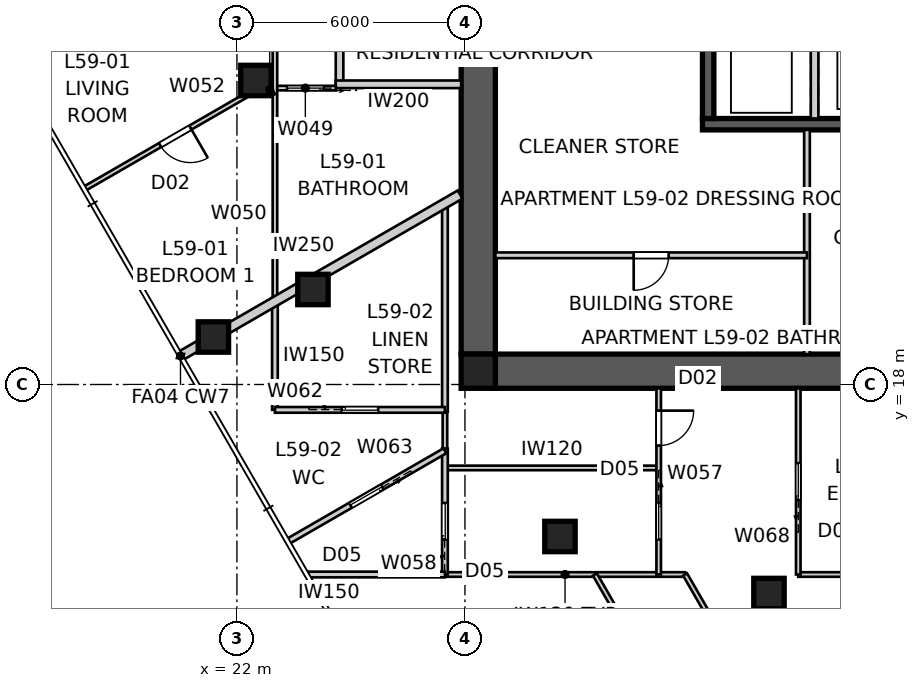
"""IFC4 building model, lengths in metres.
Left out: names, types, materials, properties, quantities, classifications, styles, units other than length and angle.
Written with IfcOpenShell. Run it as: python <this file> out.ifc"""

import sys

from ifc_helpers import new_model, si_unit, direction, frame, frame_2d, origin, origin_2d, place, context, subcontext, project, spatial, polyline, rectangle, outline, extrude, element, fill, save


model = new_model("IFC4")
c1 = context("Model", 3, precision=1e-05, world=origin(), true_north=direction((0.0, 1.0)))
c2 = subcontext(c1, "Body", "Model", "MODEL_VIEW")
j1 = project(units=[si_unit("LENGTHUNIT", "METRE"), si_unit("PLANEANGLEUNIT", "RADIAN")], contexts=[c1])
p1 = place(None, origin())
s1 = spatial("IfcSite", under=j1, at=p1, CompositionType="ELEMENT")
p2 = place(p1, origin())
s2 = spatial("IfcBuilding", under=s1, at=p2, CompositionType="ELEMENT")
p3 = place(p2, frame((0.0, 0.0, 215.0)))
s3 = spatial("IfcBuildingStorey", under=s2, at=p3, CompositionType="ELEMENT", Elevation=215.0)
p4 = place(p3, frame((51.2, 18.35, 0.0), z_axis=(0.0, 0.0, 1.0), x_axis=(-1.0, 0.0, 0.0)))
e1 = element("IfcWall", 1, at=p4, inside=s3, PredefinedType="SHEAR", context=c2, shape_type="SweptSolid", body=[
    extrude(outline(polyline([(0.0, -0.45), (22.4, -0.45), (22.4, -0.025), (22.85, -0.025), (22.85, 0.025), (22.4, 0.025), (22.4, 0.45), (0.0, 0.45), (0.0, 0.025), (-0.45, 0.025), (-0.45, -0.025), (0.0, -0.025), (0.0, -0.45)])), origin(), (0.0, 0.0, 1.0), 3.4),
])
p5 = place(p3, frame((28.35, 41.2, 0.0), z_axis=(0.0, 0.0, 1.0), x_axis=(0.0, -1.0, 0.0)))
e2 = element("IfcWall", 2, at=p5, inside=s3, PredefinedType="SHEAR", context=c2, shape_type="SweptSolid", body=[
    extrude(outline(polyline([(0.0, -0.45), (22.4, -0.45), (22.4, -0.025), (22.85, -0.025), (22.85, 0.025), (22.4, 0.025), (22.4, 0.45), (0.0, 0.45), (0.0, 0.025), (-0.45, 0.025), (-0.45, -0.025), (0.0, -0.025), (0.0, -0.45)])), origin(), (0.0, 0.0, 1.0), 3.4),
])
p6 = place(p5, frame((11.14, 0.0, 0.0)))
e3 = element("IfcOpeningElement", 3, at=p6, cuts=e2, PredefinedType="OPENING", context=c2, shape_type="SweptSolid", body=[
    extrude(rectangle(XDim=1.02, YDim=2.4, at=frame_2d((0.51, 1.2))), frame((0.0, 0.46, 0.0), z_axis=(0.0, -1.0, 0.0), x_axis=(1.0, 0.0, 0.0)), (0.0, 0.0, 1.0), 0.92),
])
p7 = place(p3, frame((45.75, 24.85, 0.0), z_axis=(0.0, 0.0, 1.0), x_axis=(-1.0, 0.0, 0.0)))
e4 = element("IfcWall", 4, at=p7, inside=s3, PredefinedType="SHEAR", context=c2, shape_type="SweptSolid", body=[
    extrude(rectangle(XDim=11.5, YDim=0.3, at=frame_2d((5.75, 0.0))), origin(), (0.0, 0.0, 1.0), 3.4),
])
p8 = place(p3, frame((37.2, 27.8, 0.0), z_axis=(0.0, 0.0, 1.0), x_axis=(0.0, -1.0, 0.0)))
e5 = element("IfcWall", 5, at=p8, inside=s3, PredefinedType="SOLIDWALL", context=c2, shape_type="SweptSolid", body=[
    extrude(rectangle(XDim=2.8, YDim=0.2, at=frame_2d((1.4, 0.0))), origin(), (0.0, 0.0, 1.0), 3.4),
])
p9 = place(p3, frame((34.4, 27.8, 0.0), z_axis=(0.0, 0.0, 1.0), x_axis=(0.0, -1.0, 0.0)))
e6 = element("IfcWall", 6, at=p9, inside=s3, PredefinedType="SHEAR", context=c2, shape_type="SweptSolid", body=[
    extrude(rectangle(XDim=2.8, YDim=0.3, at=frame_2d((1.4, 0.0))), origin(), (0.0, 0.0, 1.0), 3.4),
])
p10 = place(p3, frame((28.35, 18.35, 0.0), z_axis=(0.0, 0.0, 1.0), x_axis=(1.0, 0.0, 0.0)))
e7 = element("IfcColumn", 7, at=p10, inside=s3, PredefinedType="COLUMN", context=c2, shape_type="SweptSolid", body=[
    extrude(rectangle(XDim=0.9, YDim=0.9, at=origin_2d()), origin(), (0.0, 0.0, 1.0), 3.4),
])
for number, where, z_axis, x_axis in (
    (8, (21.38, 19.25, 0.0), (0.0, 0.0, 1.0), (1.0, 0.0, 0.0)),
    (9, (22.5, 26.0, 0.0), (0.0, 0.0, 1.0), (1.0, 0.0, 0.0)),
    (10, (24.0, 20.5, 0.0), (0.0, 0.0, 1.0), (1.0, 0.0, 0.0)),
    (11, (30.5, 14.0, 0.0), (0.0, 0.0, 1.0), (1.0, 0.0, 0.0)),
    (12, (36.0, 12.5, 0.0), (0.0, 0.0, 1.0), (1.0, 0.0, 0.0)),
):
    element("IfcColumn", number, at=place(p3, frame(where, z_axis=z_axis, x_axis=x_axis)), inside=s3, PredefinedType="COLUMN", context=c2, shape_type="SweptSolid", body=[
        extrude(rectangle(XDim=0.8, YDim=0.8, at=origin_2d()), origin(), (0.0, 0.0, 1.0), 3.4),
    ])
p11 = place(p3, frame((24.7, 25.9, 0.0), z_axis=(0.0, 0.0, 1.0), x_axis=(0.0, 1.0, 0.0)))
e13 = element("IfcWall", 13, at=p11, inside=s3, PredefinedType="PARTITIONING", context=c2, shape_type="SweptSolid", body=[
    extrude(rectangle(XDim=8.2, YDim=0.2, at=frame_2d((4.1, 0.0))), origin(), (0.0, 0.0, 1.0), 3.25),
])
p12 = place(p11, frame((2.687, 0.0, 0.0)))
e14 = element("IfcOpeningElement", 14, at=p12, cuts=e13, PredefinedType="OPENING", context=c2, shape_type="SweptSolid", body=[
    extrude(rectangle(XDim=1.02, YDim=2.34, at=frame_2d((0.51, 1.17))), frame((0.0, 0.11, 0.0), z_axis=(0.0, -1.0, 0.0), x_axis=(1.0, 0.0, 0.0)), (0.0, 0.0, 1.0), 0.22),
])
p13 = place(p3, frame((27.9, 25.9, 0.0), z_axis=(0.0, 0.0, 1.0), x_axis=(-1.0, 0.0, 0.0)))
e15 = element("IfcWall", 15, at=p13, inside=s3, PredefinedType="PARTITIONING", context=c2, shape_type="SweptSolid", body=[
    extrude(rectangle(XDim=3.3, YDim=0.2, at=frame_2d((1.65, 0.0))), origin(), (0.0, 0.0, 1.0), 3.25),
])
p14 = place(p3, frame((20.514, 18.75, 0.0), z_axis=(0.0, 0.0, 1.0), x_axis=(0.866020489494, 0.500008511703, 0.0)))
e16 = element("IfcWall", 16, at=p14, inside=s3, PredefinedType="PARTITIONING", context=c2, shape_type="SweptSolid", body=[
    extrude(rectangle(XDim=8.496, YDim=0.25, at=frame_2d((4.248, 0.0))), origin(), (0.0, 0.0, 1.0), 3.25),
])
p15 = place(p3, frame((15.889, 26.761, 0.0), z_axis=(0.0, 0.0, 1.0), x_axis=(0.866024190901, 0.50000210077, 0.0)))
e17 = element("IfcWall", 17, at=p15, inside=s3, PredefinedType="PARTITIONING", context=c2, shape_type="SweptSolid", body=[
    extrude(rectangle(XDim=10.026, YDim=0.25, at=frame_2d((5.013, 0.0))), origin(), (0.0, 0.0, 1.0), 3.25),
])
p16 = place(p3, frame((37.0, 18.8, 0.0), z_axis=(0.0, 0.0, 1.0), x_axis=(0.0, 1.0, 0.0)))
e18 = element("IfcWall", 18, at=p16, inside=s3, PredefinedType="SOLIDWALL", context=c2, shape_type="SweptSolid", body=[
    extrude(rectangle(XDim=5.9, YDim=0.15, at=frame_2d((2.95, 0.0))), origin(), (0.0, 0.0, 1.0), 3.25),
])
p17 = place(p3, frame((37.0, 21.4, 0.0), z_axis=(0.0, 0.0, 1.0), x_axis=(-1.0, 0.0, 0.0)))
e19 = element("IfcWall", 19, at=p17, inside=s3, PredefinedType="SOLIDWALL", context=c2, shape_type="SweptSolid", body=[
    extrude(rectangle(XDim=8.2, YDim=0.15, at=frame_2d((4.1, 0.0))), origin(), (0.0, 0.0, 1.0), 3.25),
])
p18 = place(p17, frame((3.64, 0.0, 0.0)))
e20 = element("IfcOpeningElement", 20, at=p18, cuts=e19, PredefinedType="OPENING", context=c2, shape_type="SweptSolid", body=[
    extrude(rectangle(XDim=0.92, YDim=2.1, at=frame_2d((0.46, 1.05))), frame((0.0, 0.085, 0.0), z_axis=(0.0, -1.0, 0.0), x_axis=(1.0, 0.0, 0.0)), (0.0, 0.0, 1.0), 0.17),
])
p19 = place(p3, frame((24.6, 25.8, 0.0), z_axis=(0.0, 0.0, 1.0), x_axis=(-1.0, 0.0, 0.0)))
e21 = element("IfcWall", 21, at=p19, inside=s3, PredefinedType="PARTITIONING", context=c2, shape_type="SweptSolid", body=[
    extrude(rectangle(XDim=1.6, YDim=0.12, at=frame_2d((0.8, 0.0))), origin(), (0.0, 0.0, 1.0), 3.25),
])
p20 = place(p19, frame((0.32, 0.0, 0.0)))
e22 = element("IfcOpeningElement", 22, at=p20, cuts=e21, PredefinedType="OPENING", context=c2, shape_type="SweptSolid", body=[
    extrude(rectangle(XDim=0.96, YDim=2.1, at=frame_2d((0.48, 1.05))), frame((0.0, 0.07, 0.0), z_axis=(0.0, -1.0, 0.0), x_axis=(1.0, 0.0, 0.0)), (0.0, 0.0, 1.0), 0.14),
])
p21 = place(p3, frame((23.0, 20.185, 0.0), z_axis=(0.0, 0.0, 1.0), x_axis=(0.0, 1.0, 0.0)))
e23 = element("IfcWall", 23, at=p21, inside=s3, PredefinedType="PARTITIONING", context=c2, shape_type="SweptSolid", body=[
    extrude(rectangle(XDim=17.18, YDim=0.12, at=frame_2d((8.59, 0.0))), origin(), (0.0, 0.0, 1.0), 2.55),
])
p22 = place(p21, frame((7.688, 0.0, 0.0)))
e24 = element("IfcOpeningElement", 24, at=p22, cuts=e23, PredefinedType="OPENING", context=c2, shape_type="SweptSolid", body=[
    extrude(rectangle(XDim=0.92, YDim=2.34, at=frame_2d((0.46, 1.17))), frame((0.0, 0.07, 0.0), z_axis=(0.0, -1.0, 0.0), x_axis=(1.0, 0.0, 0.0)), (0.0, 0.0, 1.0), 0.14),
])
p23 = place(p21, frame((14.371, 0.0, 0.0)))
e25 = element("IfcOpeningElement", 25, at=p23, cuts=e23, PredefinedType="OPENING", context=c2, shape_type="SweptSolid", body=[
    extrude(rectangle(XDim=0.92, YDim=2.34, at=frame_2d((0.46, 1.17))), frame((0.0, 0.07, 0.0), z_axis=(0.0, -1.0, 0.0), x_axis=(1.0, 0.0, 0.0)), (0.0, 0.0, 1.0), 0.14),
])
p24 = place(p3, frame((22.95, 25.612, 0.0), z_axis=(0.0, 0.0, 1.0), x_axis=(-0.49996389635, 0.866046247233, 0.0)))
e26 = element("IfcWall", 26, at=p24, inside=s3, PredefinedType="PARTITIONING", context=c2, shape_type="SweptSolid", body=[
    extrude(rectangle(XDim=0.35, YDim=0.12, at=frame_2d((0.175, 0.0))), origin(), (0.0, 0.0, 1.0), 3.25),
])
p25 = place(p3, frame((22.775, 25.915, 0.0), z_axis=(0.0, 0.0, 1.0), x_axis=(-0.866019274569, -0.500010615962, 0.0)))
e27 = element("IfcWall", 27, at=p25, inside=s3, PredefinedType="PARTITIONING", context=c2, shape_type="SweptSolid", body=[
    extrude(rectangle(XDim=5.5, YDim=0.12, at=frame_2d((2.75, 0.0))), origin(), (0.0, 0.0, 1.0), 3.25),
])
p26 = place(p25, frame((2.31, 0.0, 0.0)))
e28 = element("IfcOpeningElement", 28, at=p26, cuts=e27, PredefinedType="OPENING", context=c2, shape_type="SweptSolid", body=[
    extrude(rectangle(XDim=0.92, YDim=2.34, at=frame_2d((0.46, 1.17))), frame((0.0, 0.07, 0.0), z_axis=(0.0, -1.0, 0.0), x_axis=(1.0, 0.0, 0.0)), (0.0, 0.0, 1.0), 0.14),
])
p27 = place(p3, frame((27.473, 15.805, 0.0), z_axis=(0.0, 0.0, 1.0), x_axis=(1.0, 0.0, 0.0)))
e29 = element("IfcWall", 29, at=p27, inside=s3, PredefinedType="PARTITIONING", context=c2, shape_type="SweptSolid", body=[
    extrude(rectangle(XDim=5.625, YDim=0.12, at=frame_2d((2.812, 0.0))), origin(), (0.0, 0.0, 1.0), 3.25),
])
p28 = place(p3, frame((33.793, 13.0, 0.0), z_axis=(0.0, 0.0, 1.0), x_axis=(-1.0, 0.0, 0.0)))
e30 = element("IfcWall", 30, at=p28, inside=s3, PredefinedType="PARTITIONING", context=c2, shape_type="SweptSolid", body=[
    extrude(rectangle(XDim=6.32, YDim=0.12, at=frame_2d((3.16, 0.0))), origin(), (0.0, 0.0, 1.0), 3.25),
])
p29 = place(p3, frame((33.098, 17.9, 0.0), z_axis=(0.0, 0.0, 1.0), x_axis=(0.0, -1.0, 0.0)))
e31 = element("IfcWall", 31, at=p29, inside=s3, PredefinedType="PARTITIONING", context=c2, shape_type="SweptSolid", body=[
    extrude(rectangle(XDim=4.9, YDim=0.12, at=frame_2d((2.45, 0.0))), origin(), (0.0, 0.0, 1.0), 3.25),
])
p30 = place(p29, frame((3.018, 0.0, 0.0)))
e32 = element("IfcOpeningElement", 32, at=p30, cuts=e31, PredefinedType="OPENING", context=c2, shape_type="SweptSolid", body=[
    extrude(rectangle(XDim=0.96, YDim=2.1, at=frame_2d((0.48, 1.05))), frame((0.0, 0.07, 0.0), z_axis=(0.0, -1.0, 0.0), x_axis=(1.0, 0.0, 0.0)), (0.0, 0.0, 1.0), 0.14),
])
p31 = place(p29, frame((0.588, 0.0, 0.0)))
e33 = element("IfcOpeningElement", 33, at=p31, cuts=e31, PredefinedType="OPENING", context=c2, shape_type="SweptSolid", body=[
    extrude(rectangle(XDim=0.92, YDim=2.34, at=frame_2d((0.46, 1.17))), frame((0.0, 0.07, 0.0), z_axis=(0.0, -1.0, 0.0), x_axis=(1.0, 0.0, 0.0)), (0.0, 0.0, 1.0), 0.14),
])
p32 = place(p3, frame((27.473, 13.0, 0.0), z_axis=(0.0, 0.0, 1.0), x_axis=(0.0, 1.0, 0.0)))
e34 = element("IfcWall", 34, at=p32, inside=s3, PredefinedType="SOLIDWALL", context=c2, shape_type="SweptSolid", body=[
    extrude(rectangle(XDim=3.314, YDim=0.15, at=frame_2d((1.657, 0.0))), origin(), (0.0, 0.0, 1.0), 3.25),
])
p33 = place(p32, frame((0.922, 0.0, 0.0)))
e35 = element("IfcOpeningElement", 35, at=p33, cuts=e34, PredefinedType="OPENING", context=c2, shape_type="SweptSolid", body=[
    extrude(rectangle(XDim=0.96, YDim=2.1, at=frame_2d((0.48, 1.05))), frame((0.0, 0.085, 0.0), z_axis=(0.0, -1.0, 0.0), x_axis=(1.0, 0.0, 0.0)), (0.0, 0.0, 1.0), 0.17),
])
p34 = place(p3, frame((27.473, 16.314, 0.0), z_axis=(0.0, 0.0, 1.0), x_axis=(0.0, 1.0, 0.0)))
e36 = element("IfcWall", 36, at=p34, inside=s3, PredefinedType="PARTITIONING", context=c2, shape_type="SweptSolid", body=[
    extrude(rectangle(XDim=0.969, YDim=0.12, at=frame_2d((0.484, 0.0))), origin(), (0.0, 0.0, 1.0), 3.25),
])
p35 = place(p3, frame((27.473, 17.282, 0.0), z_axis=(0.0, 0.0, 1.0), x_axis=(0.0, 1.0, 0.0)))
e37 = element("IfcWall", 37, at=p35, inside=s3, PredefinedType="SOLIDWALL", context=c2, shape_type="SweptSolid", body=[
    extrude(rectangle(XDim=5.485, YDim=0.15, at=frame_2d((2.743, 0.0))), origin(), (0.0, 0.0, 1.0), 3.25),
])
p36 = place(p3, frame((23.0, 20.185, 0.0), z_axis=(0.0, 0.0, 1.0), x_axis=(0.0, -1.0, 0.0)))
e38 = element("IfcWall", 38, at=p36, inside=s3, PredefinedType="SOLIDWALL", context=c2, shape_type="SweptSolid", body=[
    extrude(rectangle(XDim=2.853, YDim=0.15, at=frame_2d((1.426, 0.0))), origin(), (0.0, 0.0, 1.0), 3.25),
])
p37 = place(p3, frame((23.0, 17.332, 0.0), z_axis=(0.0, 0.0, 1.0), x_axis=(1.0, 0.0, 0.0)))
e39 = element("IfcWall", 39, at=p37, inside=s3, PredefinedType="SOLIDWALL", context=c2, shape_type="SweptSolid", body=[
    extrude(rectangle(XDim=4.473, YDim=0.15, at=frame_2d((2.237, 0.0))), origin(), (0.0, 0.0, 1.0), 3.25),
])
p38 = place(p37, frame((1.757, 0.0, 0.0)))
e40 = element("IfcOpeningElement", 40, at=p38, cuts=e39, PredefinedType="OPENING", context=c2, shape_type="SweptSolid", body=[
    extrude(rectangle(XDim=0.96, YDim=2.1, at=frame_2d((0.48, 1.05))), frame((0.0, 0.085, 0.0), z_axis=(0.0, -1.0, 0.0), x_axis=(1.0, 0.0, 0.0)), (0.0, 0.0, 1.0), 0.17),
])
p39 = place(p3, frame((27.473, 16.256, 0.0), z_axis=(0.0, 0.0, 1.0), x_axis=(-0.866047486323, -0.49996174997, 0.0)))
e41 = element("IfcWall", 41, at=p39, inside=s3, PredefinedType="SOLIDWALL", context=c2, shape_type="SweptSolid", body=[
    extrude(rectangle(XDim=4.74, YDim=0.15, at=frame_2d((2.37, 0.0))), origin(), (0.0, 0.0, 1.0), 3.25),
])
p40 = place(p39, frame((1.91, 0.0, 0.0)))
e42 = element("IfcOpeningElement", 42, at=p40, cuts=e41, PredefinedType="OPENING", context=c2, shape_type="SweptSolid", body=[
    extrude(rectangle(XDim=0.96, YDim=2.1, at=frame_2d((0.48, 1.05))), frame((0.0, 0.085, 0.0), z_axis=(0.0, -1.0, 0.0), x_axis=(1.0, 0.0, 0.0)), (0.0, 0.0, 1.0), 0.17),
])
p41 = place(p3, frame((39.192, 13.0, 0.0), z_axis=(0.0, 0.0, 1.0), x_axis=(-1.0, 0.0, 0.0)))
e43 = element("IfcWall", 43, at=p41, inside=s3, PredefinedType="PARTITIONING", context=c2, shape_type="SweptSolid", body=[
    extrude(rectangle(XDim=2.421, YDim=0.12, at=frame_2d((1.21, 0.0))), origin(), (0.0, 0.0, 1.0), 3.25),
])
p42 = place(p3, frame((36.771, 13.0, 0.0), z_axis=(0.0, 0.0, 1.0), x_axis=(0.0, 1.0, 0.0)))
e44 = element("IfcWall", 44, at=p42, inside=s3, PredefinedType="PARTITIONING", context=c2, shape_type="SweptSolid", body=[
    extrude(rectangle(XDim=4.9, YDim=0.12, at=frame_2d((2.45, 0.0))), origin(), (0.0, 0.0, 1.0), 3.25),
])
p43 = place(p42, frame((1.97, 0.0, 0.0)))
e45 = element("IfcOpeningElement", 45, at=p43, cuts=e44, PredefinedType="OPENING", context=c2, shape_type="SweptSolid", body=[
    extrude(rectangle(XDim=0.96, YDim=2.1, at=frame_2d((0.48, 1.05))), frame((0.0, 0.07, 0.0), z_axis=(0.0, -1.0, 0.0), x_axis=(1.0, 0.0, 0.0)), (0.0, 0.0, 1.0), 0.14),
])
p44 = place(p3, frame((31.419, 13.0, 0.0), z_axis=(0.0, 0.0, 1.0), x_axis=(0.499996550604, -0.866027395285, 0.0)))
e46 = element("IfcWall", 46, at=p44, inside=s3, PredefinedType="PARTITIONING", context=c2, shape_type="SweptSolid", body=[
    extrude(rectangle(XDim=12.028, YDim=0.12, at=frame_2d((6.014, 0.0))), origin(), (0.0, 0.0, 1.0), 3.25),
])
p45 = place(p44, frame((5.574, 0.0, 0.0)))
e47 = element("IfcOpeningElement", 47, at=p45, cuts=e46, PredefinedType="OPENING", context=c2, shape_type="SweptSolid", body=[
    extrude(rectangle(XDim=0.92, YDim=2.34, at=frame_2d((0.46, 1.17))), frame((0.0, 0.07, 0.0), z_axis=(0.0, -1.0, 0.0), x_axis=(1.0, 0.0, 0.0)), (0.0, 0.0, 1.0), 0.14),
])
p46 = place(p3, frame((23.88, 13.0, 0.0), z_axis=(0.0, 0.0, 1.0), x_axis=(1.0, 0.0, 0.0)))
e48 = element("IfcWall", 48, at=p46, inside=s3, PredefinedType="SOLIDWALL", context=c2, shape_type="SweptSolid", body=[
    extrude(rectangle(XDim=3.593, YDim=0.15, at=frame_2d((1.796, 0.0))), origin(), (0.0, 0.0, 1.0), 3.25),
])
p47 = place(p3, frame((33.793, 13.0, 0.0), z_axis=(0.0, 0.0, 1.0), x_axis=(0.499999922276, -0.866025448659, 0.0)))
e49 = element("IfcWall", 49, at=p47, inside=s3, PredefinedType="PARTITIONING", context=c2, shape_type="SweptSolid", body=[
    extrude(rectangle(XDim=10.841, YDim=0.12, at=frame_2d((5.42, 0.0))), origin(), (0.0, 0.0, 1.0), 3.25),
])
p48 = place(p47, frame((2.604, 0.0, 0.0)))
e50 = element("IfcOpeningElement", 50, at=p48, cuts=e49, PredefinedType="OPENING", context=c2, shape_type="SweptSolid", body=[
    extrude(rectangle(XDim=0.92, YDim=2.34, at=frame_2d((0.46, 1.17))), frame((0.0, 0.07, 0.0), z_axis=(0.0, -1.0, 0.0), x_axis=(1.0, 0.0, 0.0)), (0.0, 0.0, 1.0), 0.14),
])
p49 = place(p18, origin())
e51 = element("IfcDoor", 51, at=p49, inside=s3, OperationType="SINGLE_SWING_RIGHT", PredefinedType="DOOR", context=c2, shape_type="SweptSolid", body=[
    extrude(rectangle(XDim=0.92, YDim=2.1, at=frame_2d((0.46, 1.05))), frame((0.0, 0.025, 0.0), z_axis=(0.0, -1.0, 0.0), x_axis=(1.0, 0.0, 0.0)), (0.0, 0.0, 1.0), 0.05),
])
fill(e20, e51)
p50 = place(p20, origin())
e52 = element("IfcDoor", 52, at=p50, inside=s3, OperationType="SLIDING_TO_LEFT", PredefinedType="DOOR", context=c2, shape_type="SweptSolid", body=[
    extrude(rectangle(XDim=0.96, YDim=2.1, at=frame_2d((0.48, 1.05))), frame((0.0, 0.025, 0.0), z_axis=(0.0, -1.0, 0.0), x_axis=(1.0, 0.0, 0.0)), (0.0, 0.0, 1.0), 0.05),
])
fill(e22, e52)
p51 = place(p26, origin())
e53 = element("IfcDoor", 53, at=p51, inside=s3, OperationType="SINGLE_SWING_LEFT", PredefinedType="DOOR", context=c2, shape_type="SweptSolid", body=[
    extrude(rectangle(XDim=0.92, YDim=2.34, at=frame_2d((0.46, 1.17))), frame((0.0, 0.025, 0.0), z_axis=(0.0, -1.0, 0.0), x_axis=(1.0, 0.0, 0.0)), (0.0, 0.0, 1.0), 0.05),
])
fill(e28, e53)
p52 = place(p43, origin())
e54 = element("IfcDoor", 54, at=p52, inside=s3, OperationType="SLIDING_TO_LEFT", PredefinedType="DOOR", context=c2, shape_type="SweptSolid", body=[
    extrude(rectangle(XDim=0.96, YDim=2.1, at=frame_2d((0.48, 1.05))), frame((0.0, 0.025, 0.0), z_axis=(0.0, -1.0, 0.0), x_axis=(1.0, 0.0, 0.0)), (0.0, 0.0, 1.0), 0.05),
])
fill(e45, e54)
p53 = place(p30, origin())
e55 = element("IfcDoor", 55, at=p53, inside=s3, OperationType="SLIDING_TO_LEFT", PredefinedType="DOOR", context=c2, shape_type="SweptSolid", body=[
    extrude(rectangle(XDim=0.96, YDim=2.1, at=frame_2d((0.48, 1.05))), frame((0.0, 0.025, 0.0), z_axis=(0.0, -1.0, 0.0), x_axis=(1.0, 0.0, 0.0)), (0.0, 0.0, 1.0), 0.05),
])
fill(e32, e55)
p54 = place(p31, origin())
e56 = element("IfcDoor", 56, at=p54, inside=s3, OperationType="SINGLE_SWING_LEFT", PredefinedType="DOOR", context=c2, shape_type="SweptSolid", body=[
    extrude(rectangle(XDim=0.92, YDim=2.34, at=frame_2d((0.46, 1.17))), frame((0.0, 0.025, 0.0), z_axis=(0.0, -1.0, 0.0), x_axis=(1.0, 0.0, 0.0)), (0.0, 0.0, 1.0), 0.05),
])
fill(e33, e56)
p55 = place(p33, origin())
e57 = element("IfcDoor", 57, at=p55, inside=s3, OperationType="SLIDING_TO_LEFT", PredefinedType="DOOR", context=c2, shape_type="SweptSolid", body=[
    extrude(rectangle(XDim=0.96, YDim=2.1, at=frame_2d((0.48, 1.05))), frame((0.0, 0.025, 0.0), z_axis=(0.0, -1.0, 0.0), x_axis=(1.0, 0.0, 0.0)), (0.0, 0.0, 1.0), 0.05),
])
fill(e35, e57)
p56 = place(p40, origin())
e58 = element("IfcDoor", 58, at=p56, inside=s3, OperationType="SLIDING_TO_LEFT", PredefinedType="DOOR", context=c2, shape_type="SweptSolid", body=[
    extrude(rectangle(XDim=0.96, YDim=2.1, at=frame_2d((0.48, 1.05))), frame((0.0, 0.025, 0.0), z_axis=(0.0, -1.0, 0.0), x_axis=(1.0, 0.0, 0.0)), (0.0, 0.0, 1.0), 0.05),
])
fill(e42, e58)
p57 = place(p38, origin())
e59 = element("IfcDoor", 59, at=p57, inside=s3, OperationType="SLIDING_TO_LEFT", PredefinedType="DOOR", context=c2, shape_type="SweptSolid", body=[
    extrude(rectangle(XDim=0.96, YDim=2.1, at=frame_2d((0.48, 1.05))), frame((0.0, 0.025, 0.0), z_axis=(0.0, -1.0, 0.0), x_axis=(1.0, 0.0, 0.0)), (0.0, 0.0, 1.0), 0.05),
])
fill(e40, e59)
save(model, sys.argv[1])
